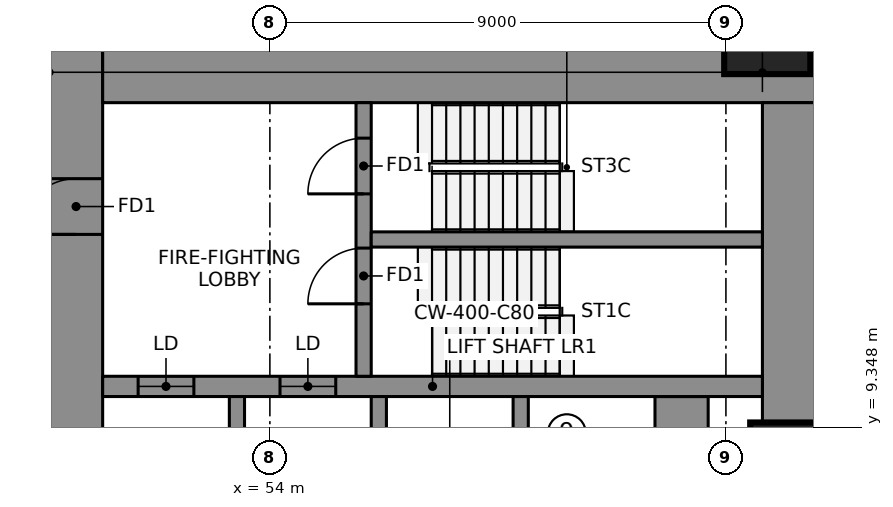
"""IFC4 building model, lengths in metres.
Left out: names, types, materials, properties, quantities, classifications, styles, units other than length and angle.
Written with IfcOpenShell. Run it as: python <this file> out.ifc"""

import sys

from ifc_helpers import new_model, si_unit, direction, frame, frame_2d, origin, origin_2d, place, context, subcontext, project, spatial, rectangle, extrude, element, fill, save


model = new_model("IFC4")
c1 = context("Model", 3, precision=1e-05, world=origin(), true_north=direction((0.0, 1.0)))
c2 = subcontext(c1, "Body", "Model", "MODEL_VIEW")
j1 = project(units=[si_unit("LENGTHUNIT", "METRE"), si_unit("PLANEANGLEUNIT", "RADIAN")], contexts=[c1])
p1 = place(None, origin())
s1 = spatial("IfcSite", under=j1, at=p1, CompositionType="ELEMENT")
p2 = place(p1, origin())
s2 = spatial("IfcBuilding", under=s1, at=p2, CompositionType="ELEMENT")
p3 = place(p2, frame((0.0, 0.0, 102.65)))
s3 = spatial("IfcBuildingStorey", under=s2, at=p3, CompositionType="ELEMENT", Elevation=102.65)
p4 = place(p3, frame((50.175, 6.65, 0.0), z_axis=(0.0, 0.0, 1.0), x_axis=(0.0, 1.0, 0.0)))
e1 = element("IfcWall", 1, at=p4, inside=s3, PredefinedType="SHEAR", context=c2, shape_type="SweptSolid", body=[
    extrude(rectangle(XDim=10.15, YDim=1.05, at=frame_2d((5.075, 0.0))), origin(), (0.0, 0.0, 1.0), 3.55),
])
p5 = place(p4, frame((6.5, 0.0, 0.0)))
e2 = element("IfcOpeningElement", 2, at=p5, cuts=e1, PredefinedType="OPENING", context=c2, shape_type="SweptSolid", body=[
    extrude(rectangle(XDim=1.1, YDim=2.1, at=frame_2d((0.55, 1.05))), frame((0.0, 0.535, 0.0), z_axis=(0.0, -1.0, 0.0), x_axis=(1.0, 0.0, 0.0)), (0.0, 0.0, 1.0), 1.07),
])
p6 = place(p3, frame((50.7, 16.275, 0.0), z_axis=(0.0, 0.0, 1.0), x_axis=(1.0, 0.0, 0.0)))
e3 = element("IfcWall", 3, at=p6, inside=s3, PredefinedType="SHEAR", context=c2, shape_type="SweptSolid", body=[
    extrude(rectangle(XDim=14.07, YDim=1.05, at=frame_2d((7.035, 0.0))), origin(), (0.0, 0.0, 1.0), 3.55),
])
p7 = place(p3, frame((64.245, 9.389, 0.0), z_axis=(0.0, 0.0, 1.0), x_axis=(0.0, 1.0, 0.0)))
e4 = element("IfcWall", 4, at=p7, inside=s3, PredefinedType="SHEAR", context=c2, shape_type="SweptSolid", body=[
    extrude(rectangle(XDim=6.361, YDim=1.05, at=frame_2d((3.181, 0.0))), origin(), (0.0, 0.0, 1.0), 3.55),
])
p8 = place(p3, frame((62.125, -9.95, 0.0), z_axis=(0.0, 0.0, 1.0), x_axis=(0.0, 1.0, 0.0)))
e5 = element("IfcWall", 5, at=p8, inside=s3, PredefinedType="SHEAR", context=c2, shape_type="SweptSolid", body=[
    extrude(rectangle(XDim=19.9, YDim=1.05, at=frame_2d((9.95, 0.0))), origin(), (0.0, 0.0, 1.0), 3.55),
])
p9 = place(p3, frame((50.7, 10.15, 0.0), z_axis=(0.0, 0.0, 1.0), x_axis=(1.0, 0.0, 0.0)))
e6 = element("IfcWall", 6, at=p9, inside=s3, PredefinedType="SHEAR", context=c2, shape_type="SweptSolid", body=[
    extrude(rectangle(XDim=13.02, YDim=0.4, at=frame_2d((6.51, 0.0))), origin(), (0.0, 0.0, 1.0), 3.55),
])
p10 = place(p9, frame((0.7, 0.0, 0.0)))
e7 = element("IfcOpeningElement", 7, at=p10, cuts=e6, PredefinedType="OPENING", context=c2, shape_type="SweptSolid", body=[
    extrude(rectangle(XDim=1.1, YDim=2.1, at=frame_2d((0.55, 1.05))), frame((0.0, 0.21, 0.0), z_axis=(0.0, -1.0, 0.0), x_axis=(1.0, 0.0, 0.0)), (0.0, 0.0, 1.0), 0.42),
])
p11 = place(p9, frame((3.5, 0.0, 0.0)))
e8 = element("IfcOpeningElement", 8, at=p11, cuts=e6, PredefinedType="OPENING", context=c2, shape_type="SweptSolid", body=[
    extrude(rectangle(XDim=1.1, YDim=2.1, at=frame_2d((0.55, 1.05))), frame((0.0, 0.21, 0.0), z_axis=(0.0, -1.0, 0.0), x_axis=(1.0, 0.0, 0.0)), (0.0, 0.0, 1.0), 0.42),
])
for number, where, z_axis, x_axis in (
    (9, (53.35, 6.95, 0.0), (0.0, 0.0, 1.0), (0.0, 1.0, 0.0)),
    (10, (56.15, 6.95, 0.0), (0.0, 0.0, 1.0), (0.0, 1.0, 0.0)),
    (11, (58.95, 6.95, 0.0), (0.0, 0.0, 1.0), (0.0, 1.0, 0.0)),
):
    element("IfcWall", number, at=place(p3, frame(where, z_axis=z_axis, x_axis=x_axis)), inside=s3, PredefinedType="SHEAR", context=c2, shape_type="SweptSolid", body=[
        extrude(rectangle(XDim=3.0, YDim=0.3, at=frame_2d((1.5, 0.0))), origin(), (0.0, 0.0, 1.0), 3.55),
    ])
p12 = place(p3, frame((55.85, 10.35, 0.0), z_axis=(0.0, 0.0, 1.0), x_axis=(0.0, 1.0, 0.0)))
e12 = element("IfcWall", 12, at=p12, inside=s3, PredefinedType="SHEAR", context=c2, shape_type="SweptSolid", body=[
    extrude(rectangle(XDim=5.4, YDim=0.3, at=frame_2d((2.7, 0.0))), origin(), (0.0, 0.0, 1.0), 3.55),
])
p13 = place(p12, frame((1.43, 0.0, 0.0)))
e13 = element("IfcOpeningElement", 13, at=p13, cuts=e12, PredefinedType="OPENING", context=c2, shape_type="SweptSolid", body=[
    extrude(rectangle(XDim=1.1, YDim=2.1, at=frame_2d((0.55, 1.05))), frame((0.0, 0.16, 0.0), z_axis=(0.0, -1.0, 0.0), x_axis=(1.0, 0.0, 0.0)), (0.0, 0.0, 1.0), 0.32),
])
p14 = place(p12, frame((3.6, 0.0, 0.0)))
e14 = element("IfcOpeningElement", 14, at=p14, cuts=e12, PredefinedType="OPENING", context=c2, shape_type="SweptSolid", body=[
    extrude(rectangle(XDim=1.1, YDim=2.1, at=frame_2d((0.55, 1.05))), frame((0.0, 0.16, 0.0), z_axis=(0.0, -1.0, 0.0), x_axis=(1.0, 0.0, 0.0)), (0.0, 0.0, 1.0), 0.32),
])
p15 = place(p3, frame((56.0, 13.05, 0.0), z_axis=(0.0, 0.0, 1.0), x_axis=(1.0, 0.0, 0.0)))
e15 = element("IfcWall", 15, at=p15, inside=s3, PredefinedType="SHEAR", context=c2, shape_type="SweptSolid", body=[
    extrude(rectangle(XDim=7.72, YDim=0.3, at=frame_2d((3.86, 0.0))), origin(), (0.0, 0.0, 1.0), 3.55),
])
for number, where, z_axis, x_axis in (
    (16, (64.329, 8.589, 0.0), (0.0, 0.0, 1.0), (1.0, 0.0, 0.0)),
    (17, (63.816, 17.164, 0.0), (0.0, 0.0, 1.0), (1.0, 0.0, 0.0)),
):
    element("IfcColumn", number, at=place(p3, frame(where, z_axis=z_axis, x_axis=x_axis)), inside=s3, PredefinedType="COLUMN", context=c2, shape_type="SweptSolid", body=[
        extrude(rectangle(XDim=1.7, YDim=1.7, at=origin_2d()), origin(), (0.0, 0.0, 1.0), 3.55),
    ])
p16 = place(p10, origin())
e18 = element("IfcDoor", 18, at=p16, inside=s3, OperationType="DOUBLE_DOOR_SLIDING", PredefinedType="DOOR", context=c2, shape_type="SweptSolid", body=[
    extrude(rectangle(XDim=1.1, YDim=2.1, at=frame_2d((0.55, 1.05))), frame((0.0, 0.025, 0.0), z_axis=(0.0, -1.0, 0.0), x_axis=(1.0, 0.0, 0.0)), (0.0, 0.0, 1.0), 0.05),
])
fill(e7, e18)
p17 = place(p11, origin())
e19 = element("IfcDoor", 19, at=p17, inside=s3, OperationType="DOUBLE_DOOR_SLIDING", PredefinedType="DOOR", context=c2, shape_type="SweptSolid", body=[
    extrude(rectangle(XDim=1.1, YDim=2.1, at=frame_2d((0.55, 1.05))), frame((0.0, 0.025, 0.0), z_axis=(0.0, -1.0, 0.0), x_axis=(1.0, 0.0, 0.0)), (0.0, 0.0, 1.0), 0.05),
])
fill(e8, e19)
p18 = place(p13, origin())
e20 = element("IfcDoor", 20, at=p18, inside=s3, OperationType="SINGLE_SWING_RIGHT", PredefinedType="DOOR", context=c2, shape_type="SweptSolid", body=[
    extrude(rectangle(XDim=1.1, YDim=2.1, at=frame_2d((0.55, 1.05))), frame((0.0, 0.025, 0.0), z_axis=(0.0, -1.0, 0.0), x_axis=(1.0, 0.0, 0.0)), (0.0, 0.0, 1.0), 0.05),
])
fill(e13, e20)
p19 = place(p14, origin())
e21 = element("IfcDoor", 21, at=p19, inside=s3, OperationType="SINGLE_SWING_RIGHT", PredefinedType="DOOR", context=c2, shape_type="SweptSolid", body=[
    extrude(rectangle(XDim=1.1, YDim=2.1, at=frame_2d((0.55, 1.05))), frame((0.0, 0.025, 0.0), z_axis=(0.0, -1.0, 0.0), x_axis=(1.0, 0.0, 0.0)), (0.0, 0.0, 1.0), 0.05),
])
fill(e14, e21)
p20 = place(p5, origin())
e22 = element("IfcDoor", 22, at=p20, inside=s3, OperationType="SINGLE_SWING_RIGHT", PredefinedType="DOOR", context=c2, shape_type="SweptSolid", body=[
    extrude(rectangle(XDim=1.1, YDim=2.1, at=frame_2d((0.55, 1.05))), frame((0.0, 0.025, 0.0), z_axis=(0.0, -1.0, 0.0), x_axis=(1.0, 0.0, 0.0)), (0.0, 0.0, 1.0), 0.05),
])
fill(e2, e22)
save(model, sys.argv[1])
